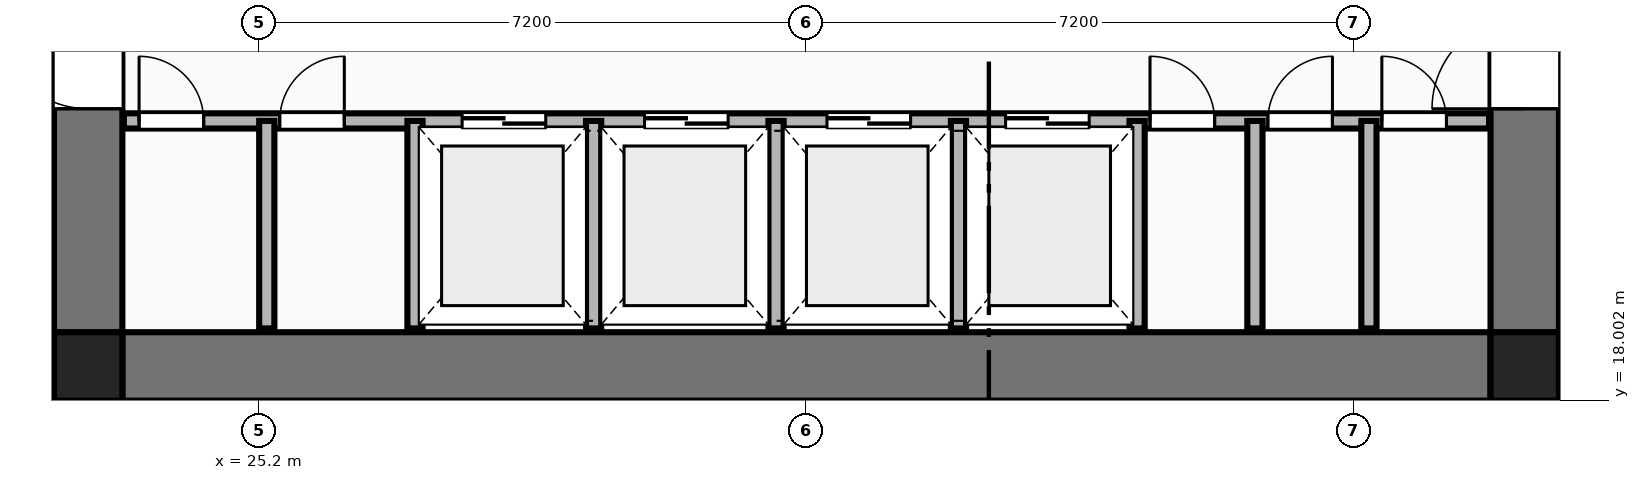
"""IFC4 building model, lengths in metres.
Left out: names, types, materials, properties, quantities, classifications, styles, units other than length and angle.
Written with IfcOpenShell. Run it as: python <this file> out.ifc"""

import sys

from ifc_helpers import new_model, si_unit, direction, frame, frame_2d, origin, origin_2d, place, context, subcontext, project, spatial, rectangle, extrude, element, fill, save


model = new_model("IFC4")
c1 = context("Model", 3, precision=1e-05, world=origin(), true_north=direction((0.0, 1.0)))
c2 = subcontext(c1, "Body", "Model", "MODEL_VIEW")
j1 = project(units=[si_unit("LENGTHUNIT", "METRE"), si_unit("PLANEANGLEUNIT", "RADIAN")], contexts=[c1])
p1 = place(None, origin())
s1 = spatial("IfcSite", under=j1, at=p1, CompositionType="ELEMENT")
p2 = place(p1, origin())
s2 = spatial("IfcBuilding", under=s1, at=p2, CompositionType="ELEMENT")
p3 = place(p2, frame((0.0, 0.0, 10.5)))
s3 = spatial("IfcBuildingStorey", under=s2, at=p3, CompositionType="ELEMENT", Elevation=10.5)
for number, where, z_axis, x_axis in (
    (1, (22.95, 18.45, 0.0), (0.0, 0.0, 1.0), (1.0, 0.0, 0.0)),
    (2, (41.85, 18.45, 0.0), (0.0, 0.0, 1.0), (1.0, 0.0, 0.0)),
):
    element("IfcColumn", number, at=place(p3, frame(where, z_axis=z_axis, x_axis=x_axis)), inside=s3, PredefinedType="COLUMN", context=c2, shape_type="SweptSolid", body=[
        extrude(rectangle(XDim=0.9, YDim=0.9, at=origin_2d()), origin(), (0.0, 0.0, 1.0), 4.5),
    ])
p4 = place(p3, frame((23.4, 18.45, 0.0), z_axis=(0.0, 0.0, 1.0), x_axis=(1.0, 0.0, 0.0)))
e3 = element("IfcWall", 3, at=p4, inside=s3, PredefinedType="SHEAR", context=c2, shape_type="SweptSolid", body=[
    extrude(rectangle(XDim=18.0, YDim=0.9, at=frame_2d((9.0, 0.0))), origin(), (0.0, 0.0, 1.0), 4.25),
])
p5 = place(p3, frame((22.95, 18.9, 0.0), z_axis=(0.0, 0.0, 1.0), x_axis=(0.0, 1.0, 0.0)))
e4 = element("IfcWall", 4, at=p5, inside=s3, PredefinedType="SHEAR", context=c2, shape_type="SweptSolid", body=[
    extrude(rectangle(XDim=14.0, YDim=0.9, at=frame_2d((7.0, 0.0))), origin(), (0.0, 0.0, 1.0), 4.25),
])
p6 = place(p5, frame((2.94, 0.0, 0.0)))
e5 = element("IfcOpeningElement", 5, at=p6, cuts=e4, PredefinedType="OPENING", context=c2, shape_type="SweptSolid", body=[
    extrude(rectangle(XDim=1.22, YDim=2.25, at=frame_2d((0.61, 1.125))), frame((0.0, 0.46, 0.0), z_axis=(0.0, -1.0, 0.0), x_axis=(1.0, 0.0, 0.0)), (0.0, 0.0, 1.0), 0.92),
])
p7 = place(p3, frame((41.85, 18.9, 0.0), z_axis=(0.0, 0.0, 1.0), x_axis=(0.0, 1.0, 0.0)))
e6 = element("IfcWall", 6, at=p7, inside=s3, PredefinedType="SHEAR", context=c2, shape_type="SweptSolid", body=[
    extrude(rectangle(XDim=14.0, YDim=0.9, at=frame_2d((7.0, 0.0))), origin(), (0.0, 0.0, 1.0), 4.25),
])
p8 = place(p7, frame((2.94, 0.0, 0.0)))
e7 = element("IfcOpeningElement", 7, at=p8, cuts=e6, PredefinedType="OPENING", context=c2, shape_type="SweptSolid", body=[
    extrude(rectangle(XDim=1.22, YDim=2.25, at=frame_2d((0.61, 1.125))), frame((0.0, 0.46, 0.0), z_axis=(0.0, -1.0, 0.0), x_axis=(1.0, 0.0, 0.0)), (0.0, 0.0, 1.0), 0.92),
])
p9 = place(p3, frame((23.42, 21.68, 0.0), z_axis=(0.0, 0.0, 1.0), x_axis=(1.0, 0.0, 0.0)))
e8 = element("IfcWall", 8, at=p9, inside=s3, PredefinedType="PLUMBINGWALL", context=c2, shape_type="SweptSolid", body=[
    extrude(rectangle(XDim=17.96, YDim=0.2, at=frame_2d((8.98, 0.0))), origin(), (0.0, 0.0, 1.0), 4.25),
])
p10 = place(p9, frame((4.45, 0.0, 0.0)))
e9 = element("IfcOpeningElement", 9, at=p10, cuts=e8, PredefinedType="OPENING", context=c2, shape_type="SweptSolid", body=[
    extrude(rectangle(XDim=1.1, YDim=2.2, at=frame_2d((0.55, 1.1))), frame((0.0, 0.11, 0.0), z_axis=(0.0, -1.0, 0.0), x_axis=(1.0, 0.0, 0.0)), (0.0, 0.0, 1.0), 0.22),
])
p11 = place(p9, frame((6.85, 0.0, 0.0)))
e10 = element("IfcOpeningElement", 10, at=p11, cuts=e8, PredefinedType="OPENING", context=c2, shape_type="SweptSolid", body=[
    extrude(rectangle(XDim=1.1, YDim=2.2, at=frame_2d((0.55, 1.1))), frame((0.0, 0.11, 0.0), z_axis=(0.0, -1.0, 0.0), x_axis=(1.0, 0.0, 0.0)), (0.0, 0.0, 1.0), 0.22),
])
p12 = place(p9, frame((9.25, 0.0, 0.0)))
e11 = element("IfcOpeningElement", 11, at=p12, cuts=e8, PredefinedType="OPENING", context=c2, shape_type="SweptSolid", body=[
    extrude(rectangle(XDim=1.1, YDim=2.2, at=frame_2d((0.55, 1.1))), frame((0.0, 0.11, 0.0), z_axis=(0.0, -1.0, 0.0), x_axis=(1.0, 0.0, 0.0)), (0.0, 0.0, 1.0), 0.22),
])
p13 = place(p9, frame((11.6, 0.0, 0.0)))
e12 = element("IfcOpeningElement", 12, at=p13, cuts=e8, PredefinedType="OPENING", context=c2, shape_type="SweptSolid", body=[
    extrude(rectangle(XDim=1.1, YDim=2.2, at=frame_2d((0.55, 1.1))), frame((0.0, 0.11, 0.0), z_axis=(0.0, -1.0, 0.0), x_axis=(1.0, 0.0, 0.0)), (0.0, 0.0, 1.0), 0.22),
])
p14 = place(p9, frame((0.2, 0.0, 0.0)))
e13 = element("IfcOpeningElement", 13, at=p14, cuts=e8, PredefinedType="OPENING", context=c2, shape_type="SweptSolid", body=[
    extrude(rectangle(XDim=0.85, YDim=2.05, at=frame_2d((0.425, 1.025))), frame((0.0, 0.11, 0.0), z_axis=(0.0, -1.0, 0.0), x_axis=(1.0, 0.0, 0.0)), (0.0, 0.0, 1.0), 0.22),
])
p15 = place(p9, frame((2.05, 0.0, 0.0)))
e14 = element("IfcOpeningElement", 14, at=p15, cuts=e8, PredefinedType="OPENING", context=c2, shape_type="SweptSolid", body=[
    extrude(rectangle(XDim=0.85, YDim=2.05, at=frame_2d((0.425, 1.025))), frame((0.0, 0.11, 0.0), z_axis=(0.0, -1.0, 0.0), x_axis=(1.0, 0.0, 0.0)), (0.0, 0.0, 1.0), 0.22),
])
p16 = place(p9, frame((13.5, 0.0, 0.0)))
e15 = element("IfcOpeningElement", 15, at=p16, cuts=e8, PredefinedType="OPENING", context=c2, shape_type="SweptSolid", body=[
    extrude(rectangle(XDim=0.85, YDim=2.05, at=frame_2d((0.425, 1.025))), frame((0.0, 0.11, 0.0), z_axis=(0.0, -1.0, 0.0), x_axis=(1.0, 0.0, 0.0)), (0.0, 0.0, 1.0), 0.22),
])
p17 = place(p9, frame((15.05, 0.0, 0.0)))
e16 = element("IfcOpeningElement", 16, at=p17, cuts=e8, PredefinedType="OPENING", context=c2, shape_type="SweptSolid", body=[
    extrude(rectangle(XDim=0.85, YDim=2.05, at=frame_2d((0.425, 1.025))), frame((0.0, 0.11, 0.0), z_axis=(0.0, -1.0, 0.0), x_axis=(1.0, 0.0, 0.0)), (0.0, 0.0, 1.0), 0.22),
])
p18 = place(p9, frame((16.55, 0.0, 0.0)))
e17 = element("IfcOpeningElement", 17, at=p18, cuts=e8, PredefinedType="OPENING", context=c2, shape_type="SweptSolid", body=[
    extrude(rectangle(XDim=0.85, YDim=2.05, at=frame_2d((0.425, 1.025))), frame((0.0, 0.11, 0.0), z_axis=(0.0, -1.0, 0.0), x_axis=(1.0, 0.0, 0.0)), (0.0, 0.0, 1.0), 0.22),
])
for number, where, z_axis, x_axis in (
    (18, (27.25, 18.95, 0.0), (0.0, 0.0, 1.0), (0.0, 1.0, 0.0)),
    (19, (29.6, 18.95, 0.0), (0.0, 0.0, 1.0), (0.0, 1.0, 0.0)),
    (20, (32.0, 18.95, 0.0), (0.0, 0.0, 1.0), (0.0, 1.0, 0.0)),
    (21, (34.4, 18.95, 0.0), (0.0, 0.0, 1.0), (0.0, 1.0, 0.0)),
    (22, (36.75, 18.95, 0.0), (0.0, 0.0, 1.0), (0.0, 1.0, 0.0)),
    (23, (25.3, 18.95, 0.0), (0.0, 0.0, 1.0), (0.0, 1.0, 0.0)),
    (24, (38.3, 18.95, 0.0), (0.0, 0.0, 1.0), (0.0, 1.0, 0.0)),
    (25, (39.8, 18.95, 0.0), (0.0, 0.0, 1.0), (0.0, 1.0, 0.0)),
):
    element("IfcWall", number, at=place(p3, frame(where, z_axis=z_axis, x_axis=x_axis)), inside=s3, PredefinedType="PLUMBINGWALL", context=c2, shape_type="SweptSolid", body=[
        extrude(rectangle(XDim=2.73, YDim=0.2, at=frame_2d((1.365, 0.0))), origin(), (0.0, 0.0, 1.0), 4.25),
    ])
p19 = place(p6, origin())
e26 = element("IfcDoor", 26, at=p19, inside=s3, OperationType="SINGLE_SWING_RIGHT", PredefinedType="DOOR", context=c2, shape_type="SweptSolid", body=[
    extrude(rectangle(XDim=1.22, YDim=2.25, at=frame_2d((0.61, 1.125))), frame((0.0, 0.025, 0.0), z_axis=(0.0, -1.0, 0.0), x_axis=(1.0, 0.0, 0.0)), (0.0, 0.0, 1.0), 0.05),
])
fill(e5, e26)
p20 = place(p8, origin())
e27 = element("IfcDoor", 27, at=p20, inside=s3, OperationType="SINGLE_SWING_LEFT", PredefinedType="DOOR", context=c2, shape_type="SweptSolid", body=[
    extrude(rectangle(XDim=1.22, YDim=2.25, at=frame_2d((0.61, 1.125))), frame((0.0, 0.025, 0.0), z_axis=(0.0, -1.0, 0.0), x_axis=(1.0, 0.0, 0.0)), (0.0, 0.0, 1.0), 0.05),
])
fill(e7, e27)
p21 = place(p10, origin())
e28 = element("IfcDoor", 28, at=p21, inside=s3, OperationType="DOUBLE_DOOR_SLIDING", PredefinedType="DOOR", context=c2, shape_type="SweptSolid", body=[
    extrude(rectangle(XDim=1.1, YDim=2.2, at=frame_2d((0.55, 1.1))), frame((0.0, 0.025, 0.0), z_axis=(0.0, -1.0, 0.0), x_axis=(1.0, 0.0, 0.0)), (0.0, 0.0, 1.0), 0.05),
])
fill(e9, e28)
p22 = place(p11, origin())
e29 = element("IfcDoor", 29, at=p22, inside=s3, OperationType="DOUBLE_DOOR_SLIDING", PredefinedType="DOOR", context=c2, shape_type="SweptSolid", body=[
    extrude(rectangle(XDim=1.1, YDim=2.2, at=frame_2d((0.55, 1.1))), frame((0.0, 0.025, 0.0), z_axis=(0.0, -1.0, 0.0), x_axis=(1.0, 0.0, 0.0)), (0.0, 0.0, 1.0), 0.05),
])
fill(e10, e29)
p23 = place(p12, origin())
e30 = element("IfcDoor", 30, at=p23, inside=s3, OperationType="DOUBLE_DOOR_SLIDING", PredefinedType="DOOR", context=c2, shape_type="SweptSolid", body=[
    extrude(rectangle(XDim=1.1, YDim=2.2, at=frame_2d((0.55, 1.1))), frame((0.0, 0.025, 0.0), z_axis=(0.0, -1.0, 0.0), x_axis=(1.0, 0.0, 0.0)), (0.0, 0.0, 1.0), 0.05),
])
fill(e11, e30)
p24 = place(p13, origin())
e31 = element("IfcDoor", 31, at=p24, inside=s3, OperationType="DOUBLE_DOOR_SLIDING", PredefinedType="DOOR", context=c2, shape_type="SweptSolid", body=[
    extrude(rectangle(XDim=1.1, YDim=2.2, at=frame_2d((0.55, 1.1))), frame((0.0, 0.025, 0.0), z_axis=(0.0, -1.0, 0.0), x_axis=(1.0, 0.0, 0.0)), (0.0, 0.0, 1.0), 0.05),
])
fill(e12, e31)
p25 = place(p14, origin())
e32 = element("IfcDoor", 32, at=p25, inside=s3, OperationType="SINGLE_SWING_LEFT", PredefinedType="DOOR", context=c2, shape_type="SweptSolid", body=[
    extrude(rectangle(XDim=0.85, YDim=2.05, at=frame_2d((0.425, 1.025))), frame((0.0, 0.025, 0.0), z_axis=(0.0, -1.0, 0.0), x_axis=(1.0, 0.0, 0.0)), (0.0, 0.0, 1.0), 0.05),
])
fill(e13, e32)
p26 = place(p15, origin())
e33 = element("IfcDoor", 33, at=p26, inside=s3, OperationType="SINGLE_SWING_RIGHT", PredefinedType="DOOR", context=c2, shape_type="SweptSolid", body=[
    extrude(rectangle(XDim=0.85, YDim=2.05, at=frame_2d((0.425, 1.025))), frame((0.0, 0.025, 0.0), z_axis=(0.0, -1.0, 0.0), x_axis=(1.0, 0.0, 0.0)), (0.0, 0.0, 1.0), 0.05),
])
fill(e14, e33)
p27 = place(p16, origin())
e34 = element("IfcDoor", 34, at=p27, inside=s3, OperationType="SINGLE_SWING_LEFT", PredefinedType="DOOR", context=c2, shape_type="SweptSolid", body=[
    extrude(rectangle(XDim=0.85, YDim=2.05, at=frame_2d((0.425, 1.025))), frame((0.0, 0.025, 0.0), z_axis=(0.0, -1.0, 0.0), x_axis=(1.0, 0.0, 0.0)), (0.0, 0.0, 1.0), 0.05),
])
fill(e15, e34)
p28 = place(p17, origin())
e35 = element("IfcDoor", 35, at=p28, inside=s3, OperationType="SINGLE_SWING_RIGHT", PredefinedType="DOOR", context=c2, shape_type="SweptSolid", body=[
    extrude(rectangle(XDim=0.85, YDim=2.05, at=frame_2d((0.425, 1.025))), frame((0.0, 0.025, 0.0), z_axis=(0.0, -1.0, 0.0), x_axis=(1.0, 0.0, 0.0)), (0.0, 0.0, 1.0), 0.05),
])
fill(e16, e35)
p29 = place(p18, origin())
e36 = element("IfcDoor", 36, at=p29, inside=s3, OperationType="SINGLE_SWING_LEFT", PredefinedType="DOOR", context=c2, shape_type="SweptSolid", body=[
    extrude(rectangle(XDim=0.85, YDim=2.05, at=frame_2d((0.425, 1.025))), frame((0.0, 0.025, 0.0), z_axis=(0.0, -1.0, 0.0), x_axis=(1.0, 0.0, 0.0)), (0.0, 0.0, 1.0), 0.05),
])
fill(e17, e36)
save(model, sys.argv[1])
